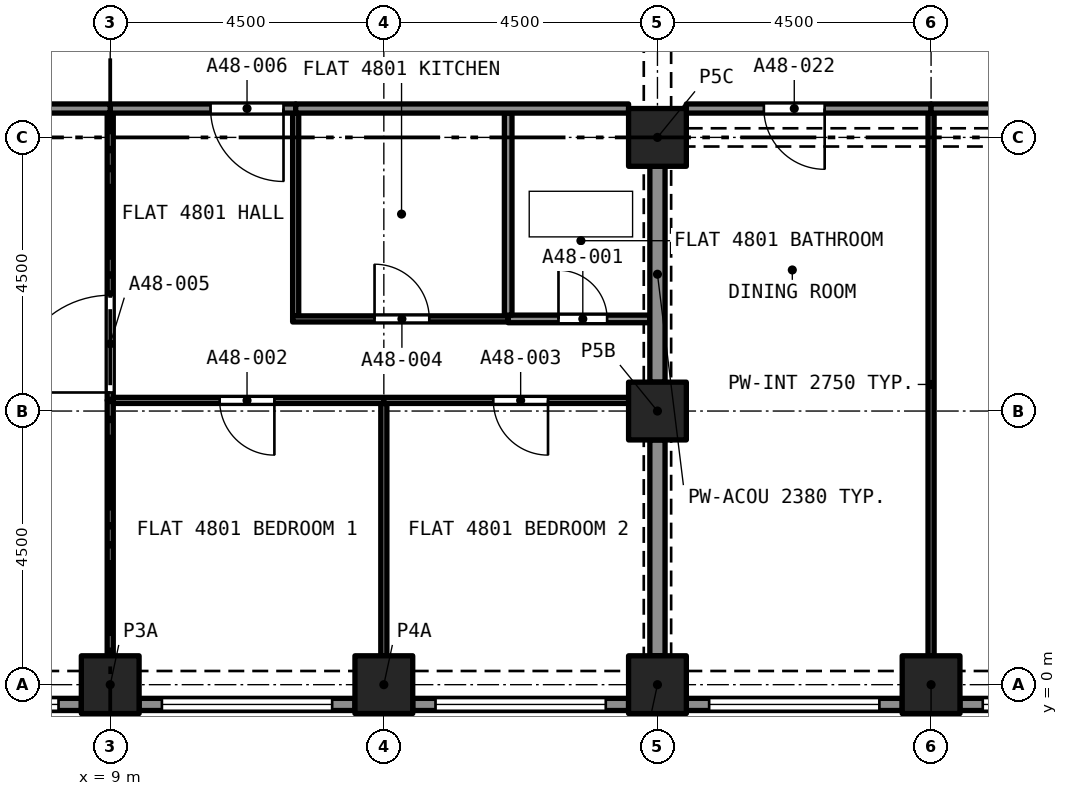
"""IFC4 building model, lengths in metres.
Left out: names, types, materials, properties, quantities, classifications, styles, units other than length and angle.
Written with IfcOpenShell. Run it as: python <this file> out.ifc"""

import sys

from ifc_helpers import new_model, si_unit, direction, frame, frame_2d, origin, origin_2d, place, context, subcontext, project, spatial, rectangle, extrude, element, fill, save


model = new_model("IFC4")
c1 = context("Model", 3, precision=1e-05, world=origin(), true_north=direction((0.0, 1.0)))
c2 = subcontext(c1, "Body", "Model", "MODEL_VIEW")
j1 = project(units=[si_unit("LENGTHUNIT", "METRE"), si_unit("PLANEANGLEUNIT", "RADIAN")], contexts=[c1])
p1 = place(None, origin())
s1 = spatial("IfcSite", under=j1, at=p1, CompositionType="ELEMENT")
p2 = place(p1, origin())
s2 = spatial("IfcBuilding", under=s1, at=p2, CompositionType="ELEMENT")
p3 = place(p2, frame((0.0, 0.0, 176.3)))
s3 = spatial("IfcBuildingStorey", under=s2, at=p3, CompositionType="ELEMENT", Elevation=176.3)
for number, where, z_axis, x_axis in (
    (1, (9.0, 0.0, 0.0), (0.0, 0.0, 1.0), (1.0, 0.0, 0.0)),
    (2, (13.5, 0.0, 0.0), (0.0, 0.0, 1.0), (1.0, 0.0, 0.0)),
    (3, (18.0, 0.0, 0.0), (0.0, 0.0, 1.0), (1.0, 0.0, 0.0)),
):
    element("IfcColumn", number, at=place(p3, frame(where, z_axis=z_axis, x_axis=x_axis)), inside=s3, PredefinedType="COLUMN", context=c2, shape_type="SweptSolid", body=[
        extrude(rectangle(XDim=0.95, YDim=0.95, at=origin_2d()), origin(), (0.0, 0.0, 1.0), 3.2),
    ])
p4 = place(p3, frame((22.5, 0.0, -0.45), z_axis=(0.0, 0.0, 1.0), x_axis=(1.0, 0.0, 0.0)))
e4 = element("IfcColumn", 4, at=p4, inside=s3, PredefinedType="COLUMN", context=c2, shape_type="SweptSolid", body=[
    extrude(rectangle(XDim=0.95, YDim=0.95, at=origin_2d()), origin(), (0.0, 0.0, 1.0), 3.65),
])
for number, where, z_axis, x_axis in (
    (5, (18.0, 4.5, 0.0), (0.0, 0.0, 1.0), (1.0, 0.0, 0.0)),
    (6, (18.0, 9.0, 0.0), (0.0, 0.0, 1.0), (1.0, 0.0, 0.0)),
):
    element("IfcColumn", number, at=place(p3, frame(where, z_axis=z_axis, x_axis=x_axis)), inside=s3, PredefinedType="COLUMN", context=c2, shape_type="SweptSolid", body=[
        extrude(rectangle(XDim=0.95, YDim=0.95, at=origin_2d()), origin(), (0.0, 0.0, 1.0), 3.2),
    ])
p5 = place(p3, frame((8.525, -0.325, 0.0), z_axis=(0.0, 0.0, 1.0), x_axis=(-1.0, 0.0, 0.0)))
e7 = element("IfcWall", 7, at=p5, inside=s3, PredefinedType="SOLIDWALL", context=c2, shape_type="SweptSolid", body=[
    extrude(rectangle(XDim=3.55, YDim=0.2, at=frame_2d((1.775, 0.0))), origin(), (0.0, 0.0, 1.0), 3.2),
])
p6 = place(p5, frame((0.375, 0.0, 0.45)))
e8 = element("IfcOpeningElement", 8, at=p6, cuts=e7, PredefinedType="OPENING", context=c2, shape_type="SweptSolid", body=[
    extrude(rectangle(XDim=2.8, YDim=1.95, at=frame_2d((1.4, 0.975))), frame((0.0, 0.11, 0.0), z_axis=(0.0, -1.0, 0.0), x_axis=(1.0, 0.0, 0.0)), (0.0, 0.0, 1.0), 0.22),
])
p7 = place(p3, frame((13.025, -0.325, 0.0), z_axis=(0.0, 0.0, 1.0), x_axis=(-1.0, 0.0, 0.0)))
e9 = element("IfcWall", 9, at=p7, inside=s3, PredefinedType="SOLIDWALL", context=c2, shape_type="SweptSolid", body=[
    extrude(rectangle(XDim=3.55, YDim=0.2, at=frame_2d((1.775, 0.0))), origin(), (0.0, 0.0, 1.0), 3.2),
])
p8 = place(p7, frame((0.375, 0.0, 0.45)))
e10 = element("IfcOpeningElement", 10, at=p8, cuts=e9, PredefinedType="OPENING", context=c2, shape_type="SweptSolid", body=[
    extrude(rectangle(XDim=2.8, YDim=1.95, at=frame_2d((1.4, 0.975))), frame((0.0, 0.11, 0.0), z_axis=(0.0, -1.0, 0.0), x_axis=(1.0, 0.0, 0.0)), (0.0, 0.0, 1.0), 0.22),
])
p9 = place(p3, frame((17.525, -0.325, 0.0), z_axis=(0.0, 0.0, 1.0), x_axis=(-1.0, 0.0, 0.0)))
e11 = element("IfcWall", 11, at=p9, inside=s3, PredefinedType="SOLIDWALL", context=c2, shape_type="SweptSolid", body=[
    extrude(rectangle(XDim=3.55, YDim=0.2, at=frame_2d((1.775, 0.0))), origin(), (0.0, 0.0, 1.0), 3.2),
])
p10 = place(p9, frame((0.375, 0.0, 0.45)))
e12 = element("IfcOpeningElement", 12, at=p10, cuts=e11, PredefinedType="OPENING", context=c2, shape_type="SweptSolid", body=[
    extrude(rectangle(XDim=2.8, YDim=1.95, at=frame_2d((1.4, 0.975))), frame((0.0, 0.11, 0.0), z_axis=(0.0, -1.0, 0.0), x_axis=(1.0, 0.0, 0.0)), (0.0, 0.0, 1.0), 0.22),
])
p11 = place(p3, frame((22.025, -0.325, 0.0), z_axis=(0.0, 0.0, 1.0), x_axis=(-1.0, 0.0, 0.0)))
e13 = element("IfcWall", 13, at=p11, inside=s3, PredefinedType="SOLIDWALL", context=c2, shape_type="SweptSolid", body=[
    extrude(rectangle(XDim=3.55, YDim=0.2, at=frame_2d((1.775, 0.0))), origin(), (0.0, 0.0, 1.0), 3.2),
])
p12 = place(p11, frame((0.375, 0.0, 0.45)))
e14 = element("IfcOpeningElement", 14, at=p12, cuts=e13, PredefinedType="OPENING", context=c2, shape_type="SweptSolid", body=[
    extrude(rectangle(XDim=2.8, YDim=1.95, at=frame_2d((1.4, 0.975))), frame((0.0, 0.11, 0.0), z_axis=(0.0, -1.0, 0.0), x_axis=(1.0, 0.0, 0.0)), (0.0, 0.0, 1.0), 0.22),
])
p13 = place(p3, frame((26.525, -0.325, 0.0), z_axis=(0.0, 0.0, 1.0), x_axis=(-1.0, 0.0, 0.0)))
e15 = element("IfcWall", 15, at=p13, inside=s3, PredefinedType="SOLIDWALL", context=c2, shape_type="SweptSolid", body=[
    extrude(rectangle(XDim=3.55, YDim=0.2, at=frame_2d((1.775, 0.0))), origin(), (0.0, 0.0, 1.0), 3.2),
])
p14 = place(p13, frame((0.375, 0.0, 0.45)))
e16 = element("IfcOpeningElement", 16, at=p14, cuts=e15, PredefinedType="OPENING", context=c2, shape_type="SweptSolid", body=[
    extrude(rectangle(XDim=2.8, YDim=1.95, at=frame_2d((1.4, 0.975))), frame((0.0, 0.11, 0.0), z_axis=(0.0, -1.0, 0.0), x_axis=(1.0, 0.0, 0.0)), (0.0, 0.0, 1.0), 0.22),
])
p15 = place(p3, frame((15.545, 6.015, 0.0), z_axis=(0.0, 0.0, 1.0), x_axis=(1.0, 0.0, 0.0)))
e17 = element("IfcWall", 17, at=p15, inside=s3, PredefinedType="PARTITIONING", context=c2, shape_type="SweptSolid", body=[
    extrude(rectangle(XDim=2.33, YDim=0.125, at=frame_2d((1.165, 0.0))), origin(), (0.0, 0.0, 1.0), 2.9),
])
p16 = place(p15, frame((0.828, 0.0, 0.0)))
e18 = element("IfcOpeningElement", 18, at=p16, cuts=e17, PredefinedType="OPENING", context=c2, shape_type="SweptSolid", body=[
    extrude(rectangle(XDim=0.8, YDim=2.1, at=frame_2d((0.4, 1.05))), frame((0.0, 0.073, 0.0), z_axis=(0.0, -1.0, 0.0), x_axis=(1.0, 0.0, 0.0)), (0.0, 0.0, 1.0), 0.145),
])
p17 = place(p3, frame((15.545, 6.077, 0.0), z_axis=(0.0, 0.0, 1.0), x_axis=(0.0, 1.0, 0.0)))
e19 = element("IfcWall", 19, at=p17, inside=s3, PredefinedType="PARTITIONING", context=c2, shape_type="SweptSolid", body=[
    extrude(rectangle(XDim=3.323, YDim=0.125, at=frame_2d((1.661, 0.0))), origin(), (0.0, 0.0, 1.0), 2.9),
])
p18 = place(p3, frame((13.5, 0.475, 0.0), z_axis=(0.0, 0.0, 1.0), x_axis=(0.0, 1.0, 0.0)))
e20 = element("IfcWall", 20, at=p18, inside=s3, PredefinedType="PARTITIONING", context=c2, shape_type="SweptSolid", body=[
    extrude(rectangle(XDim=4.15, YDim=0.1, at=frame_2d((2.075, 0.0))), origin(), (0.0, 0.0, 1.0), 2.9),
])
p19 = place(p3, frame((13.5, 4.675, 0.0), z_axis=(0.0, 0.0, 1.0), x_axis=(-1.0, 0.0, 0.0)))
e21 = element("IfcWall", 21, at=p19, inside=s3, PredefinedType="PARTITIONING", context=c2, shape_type="SweptSolid", body=[
    extrude(rectangle(XDim=4.45, YDim=0.1, at=frame_2d((2.225, 0.0))), origin(), (0.0, 0.0, 1.0), 2.9),
])
p20 = place(p19, frame((1.8, 0.0, 0.0)))
e22 = element("IfcOpeningElement", 22, at=p20, cuts=e21, PredefinedType="OPENING", context=c2, shape_type="SweptSolid", body=[
    extrude(rectangle(XDim=0.9, YDim=2.1, at=frame_2d((0.45, 1.05))), frame((0.0, 0.06, 0.0), z_axis=(0.0, -1.0, 0.0), x_axis=(1.0, 0.0, 0.0)), (0.0, 0.0, 1.0), 0.12),
])
p21 = place(p3, frame((9.0, 0.475, 0.0), z_axis=(0.0, 0.0, 1.0), x_axis=(0.0, 1.0, 0.0)))
e23 = element("IfcWall", 23, at=p21, inside=s3, PredefinedType="PARTITIONING", context=c2, shape_type="SweptSolid", body=[
    extrude(rectangle(XDim=4.2, YDim=0.1, at=frame_2d((2.1, 0.0))), origin(), (0.0, 0.0, 1.0), 2.9),
])
p22 = place(p3, frame((17.525, 4.675, 0.0), z_axis=(0.0, 0.0, 1.0), x_axis=(-1.0, 0.0, 0.0)))
e24 = element("IfcWall", 24, at=p22, inside=s3, PredefinedType="PARTITIONING", context=c2, shape_type="SweptSolid", body=[
    extrude(rectangle(XDim=4.025, YDim=0.1, at=frame_2d((2.012, 0.0))), origin(), (0.0, 0.0, 1.0), 2.9),
])
p23 = place(p22, frame((1.325, 0.0, 0.0)))
e25 = element("IfcOpeningElement", 25, at=p23, cuts=e24, PredefinedType="OPENING", context=c2, shape_type="SweptSolid", body=[
    extrude(rectangle(XDim=0.9, YDim=2.1, at=frame_2d((0.45, 1.05))), frame((0.0, 0.06, 0.0), z_axis=(0.0, -1.0, 0.0), x_axis=(1.0, 0.0, 0.0)), (0.0, 0.0, 1.0), 0.12),
])
p24 = place(p3, frame((18.0, 0.475, 0.0), z_axis=(0.0, 0.0, 1.0), x_axis=(0.0, 1.0, 0.0)))
e26 = element("IfcWall", 26, at=p24, inside=s3, PredefinedType="PARTITIONING", context=c2, shape_type="SweptSolid", body=[
    extrude(rectangle(XDim=3.55, YDim=0.25, at=frame_2d((1.775, 0.0))), origin(), (0.0, 0.0, 1.0), 2.38),
])
p25 = place(p3, frame((12.05, 6.065, 0.0), z_axis=(0.0, 0.0, 1.0), x_axis=(0.0, 1.0, 0.0)))
e27 = element("IfcWall", 27, at=p25, inside=s3, PredefinedType="PARTITIONING", context=c2, shape_type="SweptSolid", body=[
    extrude(rectangle(XDim=3.335, YDim=0.1, at=frame_2d((1.667, 0.0))), origin(), (0.0, 0.0, 1.0), 2.9),
])
p26 = place(p3, frame((12.0, 6.015, 0.0), z_axis=(0.0, 0.0, 1.0), x_axis=(1.0, 0.0, 0.0)))
e28 = element("IfcWall", 28, at=p26, inside=s3, PredefinedType="PARTITIONING", context=c2, shape_type="SweptSolid", body=[
    extrude(rectangle(XDim=3.545, YDim=0.1, at=frame_2d((1.772, 0.0))), origin(), (0.0, 0.0, 1.0), 2.9),
])
p27 = place(p26, frame((1.347, 0.0, 0.0)))
e29 = element("IfcOpeningElement", 29, at=p27, cuts=e28, PredefinedType="OPENING", context=c2, shape_type="SweptSolid", body=[
    extrude(rectangle(XDim=0.9, YDim=2.1, at=frame_2d((0.45, 1.05))), frame((0.0, 0.06, 0.0), z_axis=(0.0, -1.0, 0.0), x_axis=(1.0, 0.0, 0.0)), (0.0, 0.0, 1.0), 0.12),
])
p28 = place(p3, frame((9.0, 4.675, 0.0), z_axis=(0.0, 0.0, 1.0), x_axis=(0.0, 1.0, 0.0)))
e30 = element("IfcWall", 30, at=p28, inside=s3, PredefinedType="PARTITIONING", context=c2, shape_type="SweptSolid", body=[
    extrude(rectangle(XDim=4.725, YDim=0.1, at=frame_2d((2.362, 0.0))), origin(), (0.0, 0.0, 1.0), 2.9),
])
p29 = place(p28, frame((0.13, 0.0, 0.0)))
e31 = element("IfcOpeningElement", 31, at=p29, cuts=e30, PredefinedType="OPENING", context=c2, shape_type="SweptSolid", body=[
    extrude(rectangle(XDim=1.6, YDim=2.1, at=frame_2d((0.8, 1.05))), frame((0.0, 0.06, 0.0), z_axis=(0.0, -1.0, 0.0), x_axis=(1.0, 0.0, 0.0)), (0.0, 0.0, 1.0), 0.12),
])
p30 = place(p3, frame((18.0, 4.975, 0.0), z_axis=(0.0, 0.0, 1.0), x_axis=(0.0, 1.0, 0.0)))
e32 = element("IfcWall", 32, at=p30, inside=s3, PredefinedType="PARTITIONING", context=c2, shape_type="SweptSolid", body=[
    extrude(rectangle(XDim=3.55, YDim=0.25, at=frame_2d((1.775, 0.0))), origin(), (0.0, 0.0, 1.0), 2.38),
])
p31 = place(p3, frame((12.05, 9.475, 0.0), z_axis=(0.0, 0.0, 1.0), x_axis=(-1.0, 0.0, 0.0)))
e33 = element("IfcWall", 33, at=p31, inside=s3, PredefinedType="PARTITIONING", context=c2, shape_type="SweptSolid", body=[
    extrude(rectangle(XDim=3.05, YDim=0.15, at=frame_2d((1.525, 0.0))), origin(), (0.0, 0.0, 1.0), 2.9),
])
p32 = place(p31, frame((0.2, 0.0, 0.0)))
e34 = element("IfcOpeningElement", 34, at=p32, cuts=e33, PredefinedType="OPENING", context=c2, shape_type="SweptSolid", body=[
    extrude(rectangle(XDim=1.2, YDim=2.4, at=frame_2d((0.6, 1.2))), frame((0.0, 0.085, 0.0), z_axis=(0.0, -1.0, 0.0), x_axis=(1.0, 0.0, 0.0)), (0.0, 0.0, 1.0), 0.17),
])
p33 = place(p3, frame((12.05, 9.475, 0.0), z_axis=(0.0, 0.0, 1.0), x_axis=(1.0, 0.0, 0.0)))
e35 = element("IfcWall", 35, at=p33, inside=s3, PredefinedType="PARTITIONING", context=c2, shape_type="SweptSolid", body=[
    extrude(rectangle(XDim=5.475, YDim=0.15, at=frame_2d((2.737, 0.0))), origin(), (0.0, 0.0, 1.0), 2.9),
])
p34 = place(p3, frame((0.475, 9.475, 0.0), z_axis=(0.0, 0.0, 1.0), x_axis=(1.0, 0.0, 0.0)))
e36 = element("IfcWall", 36, at=p34, inside=s3, PredefinedType="PARTITIONING", context=c2, shape_type="SweptSolid", body=[
    extrude(rectangle(XDim=8.525, YDim=0.15, at=frame_2d((4.262, 0.0))), origin(), (0.0, 0.0, 1.0), 2.9),
])
p35 = place(p3, frame((22.5, 0.475, 0.0), z_axis=(0.0, 0.0, 1.0), x_axis=(0.0, 1.0, 0.0)))
e37 = element("IfcWall", 37, at=p35, inside=s3, PredefinedType="PARTITIONING", context=c2, shape_type="SweptSolid", body=[
    extrude(rectangle(XDim=8.925, YDim=0.1, at=frame_2d((4.462, 0.0))), origin(), (0.0, 0.0, 1.0), 2.75),
])
p36 = place(p3, frame((22.5, 9.475, 0.0), z_axis=(0.0, 0.0, 1.0), x_axis=(-1.0, 0.0, 0.0)))
e38 = element("IfcWall", 38, at=p36, inside=s3, PredefinedType="PARTITIONING", context=c2, shape_type="SweptSolid", body=[
    extrude(rectangle(XDim=4.025, YDim=0.15, at=frame_2d((2.012, 0.0))), origin(), (0.0, 0.0, 1.0), 2.75),
])
p37 = place(p36, frame((1.75, 0.0, 0.0)))
e39 = element("IfcOpeningElement", 39, at=p37, cuts=e38, PredefinedType="OPENING", context=c2, shape_type="SweptSolid", body=[
    extrude(rectangle(XDim=1.0, YDim=2.1, at=frame_2d((0.5, 1.05))), frame((0.0, 0.085, 0.0), z_axis=(0.0, -1.0, 0.0), x_axis=(1.0, 0.0, 0.0)), (0.0, 0.0, 1.0), 0.17),
])
p38 = place(p3, frame((31.025, 9.475, 0.0), z_axis=(0.0, 0.0, 1.0), x_axis=(-1.0, 0.0, 0.0)))
e40 = element("IfcWall", 40, at=p38, inside=s3, PredefinedType="PARTITIONING", context=c2, shape_type="SweptSolid", body=[
    extrude(rectangle(XDim=8.525, YDim=0.15, at=frame_2d((4.262, 0.0))), origin(), (0.0, 0.0, 1.0), 2.75),
])
p39 = place(p38, frame((3.762, 0.0, 0.0)))
e41 = element("IfcOpeningElement", 41, at=p39, cuts=e40, PredefinedType="OPENING", context=c2, shape_type="SweptSolid", body=[
    extrude(rectangle(XDim=1.0, YDim=2.1, at=frame_2d((0.5, 1.05))), frame((0.0, 0.085, 0.0), z_axis=(0.0, -1.0, 0.0), x_axis=(1.0, 0.0, 0.0)), (0.0, 0.0, 1.0), 0.17),
])
p40 = place(p6, origin())
e42 = element("IfcWindow", 42, at=p40, inside=s3, PartitioningType="SINGLE_PANEL", PredefinedType="WINDOW", context=c2, shape_type="SweptSolid", body=[
    extrude(rectangle(XDim=2.8, YDim=1.95, at=frame_2d((1.4, 0.975))), frame((0.0, 0.03, 0.0), z_axis=(0.0, -1.0, 0.0), x_axis=(1.0, 0.0, 0.0)), (0.0, 0.0, 1.0), 0.06),
])
fill(e8, e42)
p41 = place(p8, origin())
e43 = element("IfcWindow", 43, at=p41, inside=s3, PartitioningType="SINGLE_PANEL", PredefinedType="WINDOW", context=c2, shape_type="SweptSolid", body=[
    extrude(rectangle(XDim=2.8, YDim=1.95, at=frame_2d((1.4, 0.975))), frame((0.0, 0.03, 0.0), z_axis=(0.0, -1.0, 0.0), x_axis=(1.0, 0.0, 0.0)), (0.0, 0.0, 1.0), 0.06),
])
fill(e10, e43)
p42 = place(p10, origin())
e44 = element("IfcWindow", 44, at=p42, inside=s3, PartitioningType="SINGLE_PANEL", PredefinedType="WINDOW", context=c2, shape_type="SweptSolid", body=[
    extrude(rectangle(XDim=2.8, YDim=1.95, at=frame_2d((1.4, 0.975))), frame((0.0, 0.03, 0.0), z_axis=(0.0, -1.0, 0.0), x_axis=(1.0, 0.0, 0.0)), (0.0, 0.0, 1.0), 0.06),
])
fill(e12, e44)
p43 = place(p12, origin())
e45 = element("IfcWindow", 45, at=p43, inside=s3, PartitioningType="SINGLE_PANEL", PredefinedType="WINDOW", context=c2, shape_type="SweptSolid", body=[
    extrude(rectangle(XDim=2.8, YDim=1.95, at=frame_2d((1.4, 0.975))), frame((0.0, 0.03, 0.0), z_axis=(0.0, -1.0, 0.0), x_axis=(1.0, 0.0, 0.0)), (0.0, 0.0, 1.0), 0.06),
])
fill(e14, e45)
p44 = place(p14, origin())
e46 = element("IfcWindow", 46, at=p44, inside=s3, PartitioningType="SINGLE_PANEL", PredefinedType="WINDOW", context=c2, shape_type="SweptSolid", body=[
    extrude(rectangle(XDim=2.8, YDim=1.95, at=frame_2d((1.4, 0.975))), frame((0.0, 0.03, 0.0), z_axis=(0.0, -1.0, 0.0), x_axis=(1.0, 0.0, 0.0)), (0.0, 0.0, 1.0), 0.06),
])
fill(e16, e46)
p45 = place(p16, origin())
e47 = element("IfcDoor", 47, at=p45, inside=s3, OperationType="SINGLE_SWING_RIGHT", PredefinedType="DOOR", context=c2, shape_type="SweptSolid", body=[
    extrude(rectangle(XDim=0.8, YDim=2.1, at=frame_2d((0.4, 1.05))), frame((0.0, 0.025, 0.0), z_axis=(0.0, -1.0, 0.0), x_axis=(1.0, 0.0, 0.0)), (0.0, 0.0, 1.0), 0.05),
])
fill(e18, e47)
p46 = place(p20, origin())
e48 = element("IfcDoor", 48, at=p46, inside=s3, OperationType="SINGLE_SWING_RIGHT", PredefinedType="DOOR", context=c2, shape_type="SweptSolid", body=[
    extrude(rectangle(XDim=0.9, YDim=2.1, at=frame_2d((0.45, 1.05))), frame((0.0, 0.025, 0.0), z_axis=(0.0, -1.0, 0.0), x_axis=(1.0, 0.0, 0.0)), (0.0, 0.0, 1.0), 0.05),
])
fill(e22, e48)
p47 = place(p23, origin())
e49 = element("IfcDoor", 49, at=p47, inside=s3, OperationType="SINGLE_SWING_LEFT", PredefinedType="DOOR", context=c2, shape_type="SweptSolid", body=[
    extrude(rectangle(XDim=0.9, YDim=2.1, at=frame_2d((0.45, 1.05))), frame((0.0, 0.025, 0.0), z_axis=(0.0, -1.0, 0.0), x_axis=(1.0, 0.0, 0.0)), (0.0, 0.0, 1.0), 0.05),
])
fill(e25, e49)
p48 = place(p27, origin())
e50 = element("IfcDoor", 50, at=p48, inside=s3, OperationType="SINGLE_SWING_RIGHT", PredefinedType="DOOR", context=c2, shape_type="SweptSolid", body=[
    extrude(rectangle(XDim=0.9, YDim=2.1, at=frame_2d((0.45, 1.05))), frame((0.0, 0.025, 0.0), z_axis=(0.0, -1.0, 0.0), x_axis=(1.0, 0.0, 0.0)), (0.0, 0.0, 1.0), 0.05),
])
fill(e29, e50)
p49 = place(p29, origin())
e51 = element("IfcDoor", 51, at=p49, inside=s3, OperationType="SINGLE_SWING_LEFT", PredefinedType="DOOR", context=c2, shape_type="SweptSolid", body=[
    extrude(rectangle(XDim=1.6, YDim=2.1, at=frame_2d((0.8, 1.05))), frame((0.0, 0.025, 0.0), z_axis=(0.0, -1.0, 0.0), x_axis=(1.0, 0.0, 0.0)), (0.0, 0.0, 1.0), 0.05),
])
fill(e31, e51)
p50 = place(p32, origin())
e52 = element("IfcDoor", 52, at=p50, inside=s3, OperationType="SINGLE_SWING_LEFT", PredefinedType="DOOR", context=c2, shape_type="SweptSolid", body=[
    extrude(rectangle(XDim=1.2, YDim=2.4, at=frame_2d((0.6, 1.2))), frame((0.0, 0.025, 0.0), z_axis=(0.0, -1.0, 0.0), x_axis=(1.0, 0.0, 0.0)), (0.0, 0.0, 1.0), 0.05),
])
fill(e34, e52)
p51 = place(p37, origin())
e53 = element("IfcDoor", 53, at=p51, inside=s3, OperationType="SINGLE_SWING_RIGHT", PredefinedType="DOOR", context=c2, shape_type="SweptSolid", body=[
    extrude(rectangle(XDim=1.0, YDim=2.1, at=frame_2d((0.5, 1.05))), frame((0.0, 0.025, 0.0), z_axis=(0.0, -1.0, 0.0), x_axis=(1.0, 0.0, 0.0)), (0.0, 0.0, 1.0), 0.05),
])
fill(e39, e53)
save(model, sys.argv[1])
